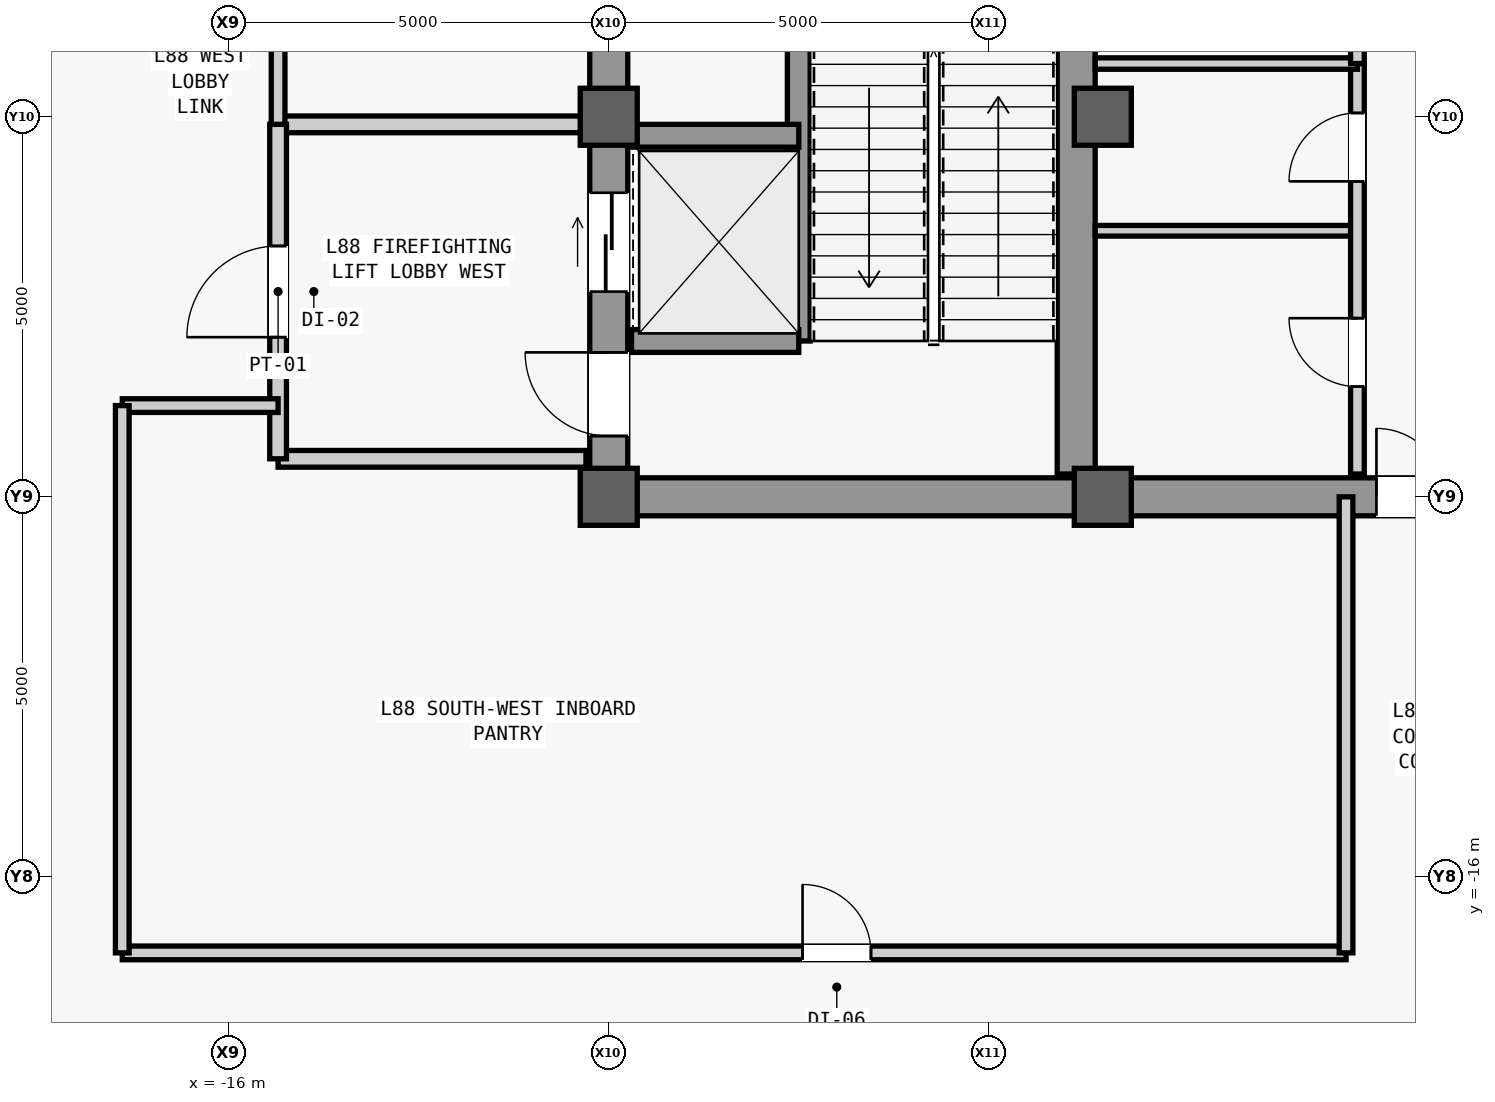
"""IFC4 building model, lengths in metres.
Left out: names, types, materials, properties, quantities, classifications, styles, units other than length and angle.
Written with IfcOpenShell. Run it as: python <this file> out.ifc"""

import sys

from ifc_helpers import new_model, si_unit, direction, frame, frame_2d, origin, origin_2d, place, context, subcontext, project, spatial, rectangle, extrude, source, transform, mapped, element, fill, save


model = new_model("IFC4")
c1 = context("Model", 3, precision=1e-05, world=origin(), true_north=direction((0.0, 1.0)))
c2 = subcontext(c1, "Body", "Model", "MODEL_VIEW")
j1 = project(units=[si_unit("LENGTHUNIT", "METRE"), si_unit("PLANEANGLEUNIT", "RADIAN")], contexts=[c1])
p1 = place(None, origin())
s1 = spatial("IfcSite", under=j1, at=p1, CompositionType="ELEMENT")
p2 = place(p1, origin())
s2 = spatial("IfcBuilding", under=s1, at=p2, CompositionType="ELEMENT")
p3 = place(p2, frame((0.0, 0.0, 370.3)))
s3 = spatial("IfcBuildingStorey", under=s2, at=p3, CompositionType="ELEMENT", Elevation=370.3)
m1 = source(origin(), c2, "Body", "SweptSolid", [
    extrude(rectangle(XDim=22.0, YDim=0.5, at=frame_2d((11.0, 0.0))), origin(), (0.0, 0.0, 1.0), 4.6),
])
p4 = place(p3, frame((-11.0, -11.0, 0.0), z_axis=(0.0, 0.0, 1.0), x_axis=(0.0, 1.0, 0.0)))
e1 = element("IfcWall", 1, at=p4, inside=s3, PredefinedType="SHEAR", context=c2, shape_type="MappedRepresentation", body=[
    mapped(m1, transform((0.0, 0.0, 0.0), scale=1.0)),
])
m2 = source(origin(), c2, "Body", "SweptSolid", [
    extrude(rectangle(XDim=1.1, YDim=2.2, at=frame_2d((0.55, 1.1))), frame((0.0, 0.26, 0.0), z_axis=(0.0, -1.0, 0.0), x_axis=(1.0, 0.0, 0.0)), (0.0, 0.0, 1.0), 0.52),
])
p5 = place(p4, frame((0.8, 0.0, 0.0)))
e2 = element("IfcOpeningElement", 2, at=p5, cuts=e1, PredefinedType="OPENING", context=c2, shape_type="MappedRepresentation", body=[
    mapped(m2, transform((0.0, 0.0, 0.0), scale=1.0)),
])
p6 = place(p4, frame((12.5, 0.0, 0.0)))
e3 = element("IfcOpeningElement", 3, at=p6, cuts=e1, PredefinedType="OPENING", context=c2, shape_type="MappedRepresentation", body=[
    mapped(m2, transform((0.0, 0.0, 0.0), scale=1.0)),
])
m3 = source(origin(), c2, "Body", "SweptSolid", [
    extrude(rectangle(XDim=0.9, YDim=2.15, at=frame_2d((0.45, 1.075))), frame((0.0, 0.26, 0.0), z_axis=(0.0, -1.0, 0.0), x_axis=(1.0, 0.0, 0.0)), (0.0, 0.0, 1.0), 0.52),
])
p7 = place(p4, frame((7.575, 0.0, 0.0)))
e4 = element("IfcOpeningElement", 4, at=p7, cuts=e1, PredefinedType="OPENING", context=c2, shape_type="MappedRepresentation", body=[
    mapped(m3, transform((0.0, 0.0, 0.0), scale=1.0)),
])
m4 = source(origin(), c2, "Body", "SweptSolid", [
    extrude(rectangle(XDim=1.2, YDim=2.3, at=frame_2d((0.6, 1.15))), frame((0.0, 0.26, 0.0), z_axis=(0.0, -1.0, 0.0), x_axis=(1.0, 0.0, 0.0)), (0.0, 0.0, 1.0), 0.52),
])
p8 = place(p4, frame((14.6, 0.0, 0.0)))
e5 = element("IfcOpeningElement", 5, at=p8, cuts=e1, PredefinedType="OPENING", context=c2, shape_type="MappedRepresentation", body=[
    mapped(m4, transform((0.0, 0.0, 0.0), scale=1.0)),
])
p9 = place(p4, frame((18.2, 0.0, 0.0)))
e6 = element("IfcOpeningElement", 6, at=p9, cuts=e1, PredefinedType="OPENING", context=c2, shape_type="MappedRepresentation", body=[
    mapped(m4, transform((0.0, 0.0, 0.0), scale=1.0)),
])
m5 = source(origin(), c2, "Body", "SweptSolid", [
    extrude(rectangle(XDim=1.3, YDim=2.3, at=frame_2d((0.65, 1.15))), frame((0.0, 0.26, 0.0), z_axis=(0.0, -1.0, 0.0), x_axis=(1.0, 0.0, 0.0)), (0.0, 0.0, 1.0), 0.52),
])
p10 = place(p4, frame((2.7, 0.0, 0.0)))
e7 = element("IfcOpeningElement", 7, at=p10, cuts=e1, PredefinedType="OPENING", context=c2, shape_type="MappedRepresentation", body=[
    mapped(m5, transform((0.0, 0.0, 0.0), scale=1.0)),
])
m6 = source(origin(), c2, "Body", "SweptSolid", [
    extrude(rectangle(XDim=21.4, YDim=0.5, at=frame_2d((10.7, 0.0))), origin(), (0.0, 0.0, 1.0), 4.6),
])
p11 = place(p3, frame((-4.85, -10.7, 0.0), z_axis=(0.0, 0.0, 1.0), x_axis=(0.0, 1.0, 0.0)))
e8 = element("IfcWall", 8, at=p11, inside=s3, PredefinedType="SHEAR", context=c2, shape_type="MappedRepresentation", body=[
    mapped(m6, transform((0.0, 0.0, 0.0), scale=1.0)),
])
m7 = source(origin(), c2, "Body", "SweptSolid", [
    extrude(rectangle(XDim=5.9, YDim=0.5, at=frame_2d((2.95, 0.0))), origin(), (0.0, 0.0, 1.0), 4.6),
])
p12 = place(p3, frame((-10.75, -11.0, 0.0), z_axis=(0.0, 0.0, 1.0), x_axis=(1.0, 0.0, 0.0)))
e9 = element("IfcWall", 9, at=p12, inside=s3, PredefinedType="SHEAR", context=c2, shape_type="MappedRepresentation", body=[
    mapped(m7, transform((0.0, 0.0, 0.0), scale=1.0)),
])
m8 = source(origin(), c2, "Body", "SweptSolid", [
    extrude(rectangle(XDim=9.2, YDim=0.5, at=frame_2d((4.6, 0.0))), origin(), (0.0, 0.0, 1.0), 4.6),
])
p13 = place(p3, frame((-4.6, -11.0, 0.0), z_axis=(0.0, 0.0, 1.0), x_axis=(1.0, 0.0, 0.0)))
e10 = element("IfcWall", 10, at=p13, inside=s3, PredefinedType="SHEAR", context=c2, shape_type="MappedRepresentation", body=[
    mapped(m8, transform((0.0, 0.0, 0.0), scale=1.0)),
])
m9 = source(origin(), c2, "Body", "SweptSolid", [
    extrude(rectangle(XDim=1.8, YDim=2.25, at=frame_2d((0.9, 1.125))), frame((0.0, 0.26, 0.0), z_axis=(0.0, -1.0, 0.0), x_axis=(1.0, 0.0, 0.0)), (0.0, 0.0, 1.0), 0.52),
])
p14 = place(p13, frame((3.7, 0.0, 0.0)))
e11 = element("IfcOpeningElement", 11, at=p14, cuts=e10, PredefinedType="OPENING", context=c2, shape_type="MappedRepresentation", body=[
    mapped(m9, transform((0.0, 0.0, 0.0), scale=1.0)),
])
m10 = source(origin(), c2, "Body", "SweptSolid", [
    extrude(rectangle(XDim=0.75, YDim=0.75, at=origin_2d()), origin(), (0.0, 0.0, 1.0), 5.2),
])
for number, where, z_axis, x_axis in (
    (12, (-11.0, -11.0, 0.0), (0.0, 0.0, 1.0), (1.0, 0.0, 0.0)),
    (13, (-11.0, -6.0, 0.0), (0.0, 0.0, 1.0), (1.0, 0.0, 0.0)),
    (14, (-4.5, -11.0, 0.0), (0.0, 0.0, 1.0), (1.0, 0.0, 0.0)),
    (15, (-4.5, -6.0, 0.0), (0.0, 0.0, 1.0), (1.0, 0.0, 0.0)),
):
    element("IfcColumn", number, at=place(p3, frame(where, z_axis=z_axis, x_axis=x_axis)), inside=s3, PredefinedType="COLUMN", context=c2, shape_type="MappedRepresentation", body=[
        mapped(m10, transform((0.0, 0.0, 0.0), scale=1.0)),
    ])
m11 = source(origin(), c2, "Body", "SweptSolid", [
    extrude(rectangle(XDim=7.8, YDim=0.3, at=frame_2d((3.9, 0.0))), origin(), (0.0, 0.0, 1.0), 4.6),
])
p15 = place(p3, frame((-8.5, -8.95, 0.0), z_axis=(0.0, 0.0, 1.0), x_axis=(0.0, 1.0, 0.0)))
e16 = element("IfcWall", 16, at=p15, inside=s3, PredefinedType="SHEAR", context=c2, shape_type="MappedRepresentation", body=[
    mapped(m11, transform((0.0, 0.0, 0.0), scale=1.0)),
])
m12 = source(origin(), c2, "Body", "SweptSolid", [
    extrude(rectangle(XDim=2.2, YDim=0.3, at=frame_2d((1.1, 0.0))), origin(), (0.0, 0.0, 1.0), 4.6),
])
for number, where, z_axis, x_axis in (
    (17, (-10.7, -8.95, 0.0), (0.0, 0.0, 1.0), (1.0, 0.0, 0.0)),
    (18, (-10.7, -6.25, 0.0), (0.0, 0.0, 1.0), (1.0, 0.0, 0.0)),
):
    element("IfcWall", number, at=place(p3, frame(where, z_axis=z_axis, x_axis=x_axis)), inside=s3, PredefinedType="SHEAR", context=c2, shape_type="MappedRepresentation", body=[
        mapped(m12, transform((0.0, 0.0, 0.0), scale=1.0)),
    ])
m13 = source(origin(), c2, "Body", "SweptSolid", [
    extrude(rectangle(XDim=4.05, YDim=0.22, at=frame_2d((2.025, 0.0))), origin(), (0.0, 0.0, 1.0), 4.6),
])
p16 = place(p3, frame((-15.35, -10.5, 0.0), z_axis=(0.0, 0.0, 1.0), x_axis=(1.0, 0.0, 0.0)))
e19 = element("IfcWall", 19, at=p16, inside=s3, PredefinedType="PARTITIONING", context=c2, shape_type="MappedRepresentation", body=[
    mapped(m13, transform((0.0, 0.0, 0.0), scale=1.0)),
])
m14 = source(origin(), c2, "Body", "SweptSolid", [
    extrude(rectangle(XDim=4.05, YDim=0.22, at=frame_2d((2.025, 0.0))), origin(), (0.0, 0.0, 1.0), 2.8),
])
p17 = place(p3, frame((-15.35, -6.1, 0.0), z_axis=(0.0, 0.0, 1.0), x_axis=(1.0, 0.0, 0.0)))
e20 = element("IfcWall", 20, at=p17, inside=s3, PredefinedType="PARTITIONING", context=c2, shape_type="MappedRepresentation", body=[
    mapped(m14, transform((0.0, 0.0, 0.0), scale=1.0)),
])
m15 = source(origin(), c2, "Body", "SweptSolid", [
    extrude(rectangle(XDim=4.4, YDim=0.22, at=frame_2d((2.2, 0.0))), origin(), (0.0, 0.0, 1.0), 4.6),
])
p18 = place(p3, frame((-15.35, -10.5, 0.0), z_axis=(0.0, 0.0, 1.0), x_axis=(0.0, 1.0, 0.0)))
e21 = element("IfcWall", 21, at=p18, inside=s3, PredefinedType="PARTITIONING", context=c2, shape_type="MappedRepresentation", body=[
    mapped(m15, transform((0.0, 0.0, 0.0), scale=1.0)),
])
m16 = source(origin(), c2, "Body", "SweptSolid", [
    extrude(rectangle(XDim=1.2, YDim=2.2, at=frame_2d((0.6, 1.1))), frame((0.0, 0.12, 0.0), z_axis=(0.0, -1.0, 0.0), x_axis=(1.0, 0.0, 0.0)), (0.0, 0.0, 1.0), 0.24),
])
p19 = place(p18, frame((1.6, 0.0, 0.0)))
e22 = element("IfcOpeningElement", 22, at=p19, cuts=e21, PredefinedType="OPENING", context=c2, shape_type="MappedRepresentation", body=[
    mapped(m16, transform((0.0, 0.0, 0.0), scale=1.0)),
])
m17 = source(origin(), c2, "Body", "SweptSolid", [
    extrude(rectangle(XDim=16.6, YDim=0.18, at=frame_2d((8.3, 0.0))), origin(), (0.0, 0.0, 1.0), 4.6),
])
p20 = place(p3, frame((-15.35, -6.1, 0.0), z_axis=(0.0, 0.0, 1.0), x_axis=(0.0, 1.0, 0.0)))
e23 = element("IfcWall", 23, at=p20, inside=s3, PredefinedType="PARTITIONING", context=c2, shape_type="MappedRepresentation", body=[
    mapped(m17, transform((0.0, 0.0, 0.0), scale=1.0)),
])
m18 = source(origin(), c2, "Body", "SweptSolid", [
    extrude(rectangle(XDim=1.8, YDim=2.25, at=frame_2d((0.9, 1.125))), frame((0.0, 0.1, 0.0), z_axis=(0.0, -1.0, 0.0), x_axis=(1.0, 0.0, 0.0)), (0.0, 0.0, 1.0), 0.2),
])
p21 = place(p20, frame((2.7, 0.0, 0.0)))
e24 = element("IfcOpeningElement", 24, at=p21, cuts=e23, PredefinedType="OPENING", context=c2, shape_type="MappedRepresentation", body=[
    mapped(m18, transform((0.0, 0.0, 0.0), scale=1.0)),
])
p22 = place(p20, frame((11.0, 0.0, 0.0)))
e25 = element("IfcOpeningElement", 25, at=p22, cuts=e23, PredefinedType="OPENING", context=c2, shape_type="MappedRepresentation", body=[
    mapped(m18, transform((0.0, 0.0, 0.0), scale=1.0)),
])
m19 = source(origin(), c2, "Body", "SweptSolid", [
    extrude(rectangle(XDim=3.45, YDim=0.14, at=frame_2d((1.725, 0.0))), origin(), (0.0, 0.0, 1.0), 4.6),
])
p23 = place(p3, frame((-4.6, -7.5, 0.0), z_axis=(0.0, 0.0, 1.0), x_axis=(1.0, 0.0, 0.0)))
e26 = element("IfcWall", 26, at=p23, inside=s3, PredefinedType="PARTITIONING", context=c2, shape_type="MappedRepresentation", body=[
    mapped(m19, transform((0.0, 0.0, 0.0), scale=1.0)),
])
m20 = source(origin(), c2, "Body", "SweptSolid", [
    extrude(rectangle(XDim=5.4, YDim=0.18, at=frame_2d((2.7, 0.0))), origin(), (0.0, 0.0, 1.0), 4.6),
])
p24 = place(p3, frame((-1.15, -10.7, 0.0), z_axis=(0.0, 0.0, 1.0), x_axis=(0.0, 1.0, 0.0)))
e27 = element("IfcWall", 27, at=p24, inside=s3, PredefinedType="PARTITIONING", context=c2, shape_type="MappedRepresentation", body=[
    mapped(m20, transform((0.0, 0.0, 0.0), scale=1.0)),
])
m21 = source(origin(), c2, "Body", "SweptSolid", [
    extrude(rectangle(XDim=0.9, YDim=2.15, at=frame_2d((0.45, 1.075))), frame((0.0, 0.1, 0.0), z_axis=(0.0, -1.0, 0.0), x_axis=(1.0, 0.0, 0.0)), (0.0, 0.0, 1.0), 0.2),
])
p25 = place(p24, frame((1.15, 0.0, 0.0)))
e28 = element("IfcOpeningElement", 28, at=p25, cuts=e27, PredefinedType="OPENING", context=c2, shape_type="MappedRepresentation", body=[
    mapped(m21, transform((0.0, 0.0, 0.0), scale=1.0)),
])
p26 = place(p24, frame((3.85, 0.0, 0.0)))
e29 = element("IfcOpeningElement", 29, at=p26, cuts=e27, PredefinedType="OPENING", context=c2, shape_type="MappedRepresentation", body=[
    mapped(m21, transform((0.0, 0.0, 0.0), scale=1.0)),
])
m22 = source(origin(), c2, "Body", "SweptSolid", [
    extrude(rectangle(XDim=3.45, YDim=0.15, at=frame_2d((1.725, 0.0))), origin(), (0.0, 0.0, 1.0), 4.6),
])
p27 = place(p3, frame((-4.6, -5.3, 0.0), z_axis=(0.0, 0.0, 1.0), x_axis=(1.0, 0.0, 0.0)))
e30 = element("IfcWall", 30, at=p27, inside=s3, PredefinedType="PARTITIONING", context=c2, shape_type="MappedRepresentation", body=[
    mapped(m22, transform((0.0, 0.0, 0.0), scale=1.0)),
])
m23 = source(origin(), c2, "Body", "SweptSolid", [
    extrude(rectangle(XDim=10.6, YDim=0.18, at=frame_2d((5.3, 0.0))), origin(), (0.0, 0.0, 1.0), 4.6),
])
p28 = place(p3, frame((-1.15, -5.3, 0.0), z_axis=(0.0, 0.0, 1.0), x_axis=(0.0, 1.0, 0.0)))
e31 = element("IfcWall", 31, at=p28, inside=s3, PredefinedType="PARTITIONING", context=c2, shape_type="MappedRepresentation", body=[
    mapped(m23, transform((0.0, 0.0, 0.0), scale=1.0)),
])
p29 = place(p28, frame((1.9, 0.0, 0.0)))
e32 = element("IfcOpeningElement", 32, at=p29, cuts=e31, PredefinedType="OPENING", context=c2, shape_type="MappedRepresentation", body=[
    mapped(m21, transform((0.0, 0.0, 0.0), scale=1.0)),
])
p30 = place(p28, frame((6.55, 0.0, 0.0)))
e33 = element("IfcOpeningElement", 33, at=p30, cuts=e31, PredefinedType="OPENING", context=c2, shape_type="MappedRepresentation", body=[
    mapped(m21, transform((0.0, 0.0, 0.0), scale=1.0)),
])
p31 = place(p28, frame((9.475, 0.0, 0.0)))
e34 = element("IfcOpeningElement", 34, at=p31, cuts=e31, PredefinedType="OPENING", context=c2, shape_type="MappedRepresentation", body=[
    mapped(m21, transform((0.0, 0.0, 0.0), scale=1.0)),
])
m24 = source(origin(), c2, "Body", "SweptSolid", [
    extrude(rectangle(XDim=2.05, YDim=0.18, at=frame_2d((1.025, 0.0))), origin(), (0.0, 0.0, 1.0), 4.6),
])
p32 = place(p3, frame((-17.4, -9.8, 0.0), z_axis=(0.0, 0.0, 1.0), x_axis=(1.0, 0.0, 0.0)))
e35 = element("IfcWall", 35, at=p32, inside=s3, PredefinedType="PARTITIONING", context=c2, shape_type="MappedRepresentation", body=[
    mapped(m24, transform((0.0, 0.0, 0.0), scale=1.0)),
])
m25 = source(origin(), c2, "Body", "SweptSolid", [
    extrude(rectangle(XDim=16.1, YDim=0.18, at=frame_2d((8.05, 0.0))), origin(), (0.0, 0.0, 1.0), 4.6),
])
p33 = place(p3, frame((-17.4, -17.0, 0.0), z_axis=(0.0, 0.0, 1.0), x_axis=(1.0, 0.0, 0.0)))
e36 = element("IfcWall", 36, at=p33, inside=s3, PredefinedType="PARTITIONING", context=c2, shape_type="MappedRepresentation", body=[
    mapped(m25, transform((0.0, 0.0, 0.0), scale=1.0)),
])
p34 = place(p33, frame((8.95, 0.0, 0.0)))
e37 = element("IfcOpeningElement", 37, at=p34, cuts=e36, PredefinedType="OPENING", context=c2, shape_type="MappedRepresentation", body=[
    mapped(m21, transform((0.0, 0.0, 0.0), scale=1.0)),
])
m26 = source(origin(), c2, "Body", "SweptSolid", [
    extrude(rectangle(XDim=7.2, YDim=0.18, at=frame_2d((3.6, 0.0))), origin(), (0.0, 0.0, 1.0), 4.6),
])
p35 = place(p3, frame((-17.4, -17.0, 0.0), z_axis=(0.0, 0.0, 1.0), x_axis=(0.0, 1.0, 0.0)))
e38 = element("IfcWall", 38, at=p35, inside=s3, PredefinedType="PARTITIONING", context=c2, shape_type="MappedRepresentation", body=[
    mapped(m26, transform((0.0, 0.0, 0.0), scale=1.0)),
])
m27 = source(origin(), c2, "Body", "SweptSolid", [
    extrude(rectangle(XDim=6.0, YDim=0.18, at=frame_2d((3.0, 0.0))), origin(), (0.0, 0.0, 1.0), 4.6),
])
p36 = place(p3, frame((-1.3, -17.0, 0.0), z_axis=(0.0, 0.0, 1.0), x_axis=(0.0, 1.0, 0.0)))
e39 = element("IfcWall", 39, at=p36, inside=s3, PredefinedType="PARTITIONING", context=c2, shape_type="MappedRepresentation", body=[
    mapped(m27, transform((0.0, 0.0, 0.0), scale=1.0)),
])
m28 = source(origin(), c2, "Body", "SweptSolid", [
    extrude(rectangle(XDim=1.1, YDim=2.2, at=frame_2d((0.55, 1.1))), frame((0.0, 0.025, 0.0), z_axis=(0.0, -1.0, 0.0), x_axis=(1.0, 0.0, 0.0)), (0.0, 0.0, 1.0), 0.05),
])
p37 = place(p5, origin())
e40 = element("IfcDoor", 40, at=p37, inside=s3, OperationType="SINGLE_SWING_RIGHT", PredefinedType="DOOR", context=c2, shape_type="MappedRepresentation", body=[
    mapped(m28, transform((0.0, 0.0, 0.0), scale=1.0)),
])
fill(e2, e40)
m29 = source(origin(), c2, "Body", "SweptSolid", [
    extrude(rectangle(XDim=1.2, YDim=2.2, at=frame_2d((0.6, 1.1))), frame((0.0, 0.025, 0.0), z_axis=(0.0, -1.0, 0.0), x_axis=(1.0, 0.0, 0.0)), (0.0, 0.0, 1.0), 0.05),
])
p38 = place(p19, origin())
e41 = element("IfcDoor", 41, at=p38, inside=s3, OperationType="SINGLE_SWING_LEFT", PredefinedType="DOOR", context=c2, shape_type="MappedRepresentation", body=[
    mapped(m29, transform((0.0, 0.0, 0.0), scale=1.0)),
])
fill(e22, e41)
m30 = source(origin(), c2, "Body", "SweptSolid", [
    extrude(rectangle(XDim=0.9, YDim=2.15, at=frame_2d((0.45, 1.075))), frame((0.0, 0.025, 0.0), z_axis=(0.0, -1.0, 0.0), x_axis=(1.0, 0.0, 0.0)), (0.0, 0.0, 1.0), 0.05),
])
p39 = place(p25, origin())
e42 = element("IfcDoor", 42, at=p39, inside=s3, OperationType="SINGLE_SWING_RIGHT", PredefinedType="DOOR", context=c2, shape_type="MappedRepresentation", body=[
    mapped(m30, transform((0.0, 0.0, 0.0), scale=1.0)),
])
fill(e28, e42)
p40 = place(p26, origin())
e43 = element("IfcDoor", 43, at=p40, inside=s3, OperationType="SINGLE_SWING_LEFT", PredefinedType="DOOR", context=c2, shape_type="MappedRepresentation", body=[
    mapped(m30, transform((0.0, 0.0, 0.0), scale=1.0)),
])
fill(e29, e43)
m31 = source(origin(), c2, "Body", "SweptSolid", [
    extrude(rectangle(XDim=1.8, YDim=2.25, at=frame_2d((0.9, 1.125))), frame((0.0, 0.025, 0.0), z_axis=(0.0, -1.0, 0.0), x_axis=(1.0, 0.0, 0.0)), (0.0, 0.0, 1.0), 0.05),
])
p41 = place(p14, origin())
e44 = element("IfcDoor", 44, at=p41, inside=s3, OperationType="SINGLE_SWING_LEFT", PredefinedType="DOOR", context=c2, shape_type="MappedRepresentation", body=[
    mapped(m31, transform((0.0, 0.0, 0.0), scale=1.0)),
])
fill(e11, e44)
p42 = place(p34, origin())
e45 = element("IfcDoor", 45, at=p42, inside=s3, OperationType="SINGLE_SWING_LEFT", PredefinedType="DOOR", context=c2, shape_type="MappedRepresentation", body=[
    mapped(m30, transform((0.0, 0.0, 0.0), scale=1.0)),
])
fill(e37, e45)
m32 = source(origin(), c2, "Body", "SweptSolid", [
    extrude(rectangle(XDim=1.3, YDim=2.3, at=frame_2d((0.65, 1.15))), frame((0.0, 0.025, 0.0), z_axis=(0.0, -1.0, 0.0), x_axis=(1.0, 0.0, 0.0)), (0.0, 0.0, 1.0), 0.05),
])
p43 = place(p10, origin())
e46 = element("IfcDoor", 46, at=p43, inside=s3, OperationType="SLIDING_TO_LEFT", PredefinedType="DOOR", context=c2, shape_type="MappedRepresentation", body=[
    mapped(m32, transform((0.0, 0.0, 0.0), scale=1.0)),
])
fill(e7, e46)
save(model, sys.argv[1])
